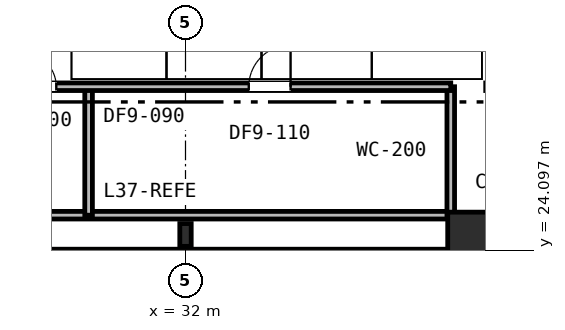
"""IFC4 building model, lengths in metres.
Left out: names, types, materials, properties, quantities, classifications, styles, units other than length and angle.
Written with IfcOpenShell. Run it as: python <this file> out.ifc"""

import sys

from ifc_helpers import new_model, si_unit, direction, frame, frame_2d, origin, origin_2d, place, context, subcontext, project, spatial, rectangle, i_section, extrude, element, fill, save


model = new_model("IFC4")
c1 = context("Model", 3, precision=1e-05, world=origin(), true_north=direction((0.0, 1.0)))
c2 = subcontext(c1, "Body", "Model", "MODEL_VIEW")
j1 = project(units=[si_unit("LENGTHUNIT", "METRE"), si_unit("PLANEANGLEUNIT", "RADIAN")], contexts=[c1])
p1 = place(None, origin())
s1 = spatial("IfcSite", under=j1, at=p1, CompositionType="ELEMENT")
p2 = place(p1, origin())
s2 = spatial("IfcBuilding", under=s1, at=p2, CompositionType="ELEMENT")
p3 = place(p2, frame((0.0, 0.0, 144.0)))
s3 = spatial("IfcBuildingStorey", under=s2, at=p3, CompositionType="ELEMENT", Elevation=144.0)
p4 = place(p3, frame((32.0, 24.5, 0.0), z_axis=(0.0, 0.0, 1.0), x_axis=(1.0, 0.0, 0.0)))
e1 = element("IfcColumn", 1, at=p4, inside=s3, PredefinedType="COLUMN", context=c2, shape_type="SweptSolid", body=[
    extrude(i_section(OverallWidth=0.3, OverallDepth=0.6, WebThickness=0.015, FlangeThickness=0.03, FilletRadius=0.027, at=origin_2d()), origin(), (0.0, 0.0, 1.0), 4.8),
])
p5 = place(p3, frame((39.5, 24.5, 0.0), z_axis=(0.0, 0.0, 1.0), x_axis=(1.0, 0.0, 0.0)))
e2 = element("IfcColumn", 2, at=p5, inside=s3, PredefinedType="COLUMN", context=c2, shape_type="SweptSolid", body=[
    extrude(rectangle(XDim=1.2, YDim=1.2, at=origin_2d()), origin(), (0.0, 0.0, 1.0), 4.8),
])
p6 = place(p3, frame((24.6, 24.0, 0.0), z_axis=(0.0, 0.0, 1.0), x_axis=(1.0, 0.0, 0.0)))
e3 = element("IfcWall", 3, at=p6, inside=s3, PredefinedType="STANDARD", context=c2, shape_type="SweptSolid", body=[
    extrude(rectangle(XDim=14.3, YDim=0.25, at=frame_2d((7.15, 0.0))), origin(), (0.0, 0.0, 1.0), 1.15),
])
p7 = place(p3, frame((8.4, 25.02, 0.0), z_axis=(0.0, 0.0, 1.0), x_axis=(1.0, 0.0, 0.0)))
e4 = element("IfcWall", 4, at=p7, inside=s3, PredefinedType="PARTITIONING", context=c2, shape_type="SweptSolid", body=[
    extrude(rectangle(XDim=30.6, YDim=0.2, at=frame_2d((15.3, 0.0))), origin(), (0.0, 0.0, 1.0), 4.02),
])
for number, where, z_axis, x_axis in (
    (5, (38.98, 25.02, 0.0), (0.0, 0.0, 1.0), (0.0, 1.0, 0.0)),
    (6, (29.45, 25.02, 0.0), (0.0, 0.0, 1.0), (0.0, 1.0, 0.0)),
):
    element("IfcWall", number, at=place(p3, frame(where, z_axis=z_axis, x_axis=x_axis)), inside=s3, PredefinedType="PARTITIONING", context=c2, shape_type="SweptSolid", body=[
        extrude(rectangle(XDim=3.38, YDim=0.2, at=frame_2d((1.69, 0.0))), origin(), (0.0, 0.0, 1.0), 4.02),
    ])
p8 = place(p3, frame((16.52, 28.4, 0.0), z_axis=(0.0, 0.0, 1.0), x_axis=(1.0, 0.0, 0.0)))
e7 = element("IfcWall", 7, at=p8, inside=s3, PredefinedType="PARTITIONING", context=c2, shape_type="SweptSolid", body=[
    extrude(rectangle(XDim=22.46, YDim=0.2, at=frame_2d((11.23, 0.0))), origin(), (0.0, 0.0, 1.0), 4.02),
])
p9 = place(p8, frame((4.615, 0.0, 0.0)))
e8 = element("IfcOpeningElement", 8, at=p9, cuts=e7, PredefinedType="OPENING", context=c2, shape_type="SweptSolid", body=[
    extrude(rectangle(XDim=1.1, YDim=2.15, at=frame_2d((0.55, 1.075))), frame((0.0, 0.11, 0.0), z_axis=(0.0, -1.0, 0.0), x_axis=(1.0, 0.0, 0.0)), (0.0, 0.0, 1.0), 0.22),
])
p10 = place(p8, frame((11.18, 0.0, 0.0)))
e9 = element("IfcOpeningElement", 9, at=p10, cuts=e7, PredefinedType="OPENING", context=c2, shape_type="SweptSolid", body=[
    extrude(rectangle(XDim=0.9, YDim=2.15, at=frame_2d((0.45, 1.075))), frame((0.0, 0.11, 0.0), z_axis=(0.0, -1.0, 0.0), x_axis=(1.0, 0.0, 0.0)), (0.0, 0.0, 1.0), 0.22),
])
p11 = place(p8, frame((17.145, 0.0, 0.0)))
e10 = element("IfcOpeningElement", 10, at=p11, cuts=e7, PredefinedType="OPENING", context=c2, shape_type="SweptSolid", body=[
    extrude(rectangle(XDim=1.1, YDim=2.15, at=frame_2d((0.55, 1.075))), frame((0.0, 0.11, 0.0), z_axis=(0.0, -1.0, 0.0), x_axis=(1.0, 0.0, 0.0)), (0.0, 0.0, 1.0), 0.22),
])
p12 = place(p10, origin())
e11 = element("IfcDoor", 11, at=p12, inside=s3, OperationType="SINGLE_SWING_LEFT", PredefinedType="DOOR", context=c2, shape_type="SweptSolid", body=[
    extrude(rectangle(XDim=0.9, YDim=2.15, at=frame_2d((0.45, 1.075))), frame((0.0, 0.025, 0.0), z_axis=(0.0, -1.0, 0.0), x_axis=(1.0, 0.0, 0.0)), (0.0, 0.0, 1.0), 0.05),
])
fill(e9, e11)
p13 = place(p11, origin())
e12 = element("IfcDoor", 12, at=p13, inside=s3, OperationType="SINGLE_SWING_RIGHT", PredefinedType="DOOR", context=c2, shape_type="SweptSolid", body=[
    extrude(rectangle(XDim=1.1, YDim=2.15, at=frame_2d((0.55, 1.075))), frame((0.0, 0.025, 0.0), z_axis=(0.0, -1.0, 0.0), x_axis=(1.0, 0.0, 0.0)), (0.0, 0.0, 1.0), 0.05),
])
fill(e10, e12)
save(model, sys.argv[1])
